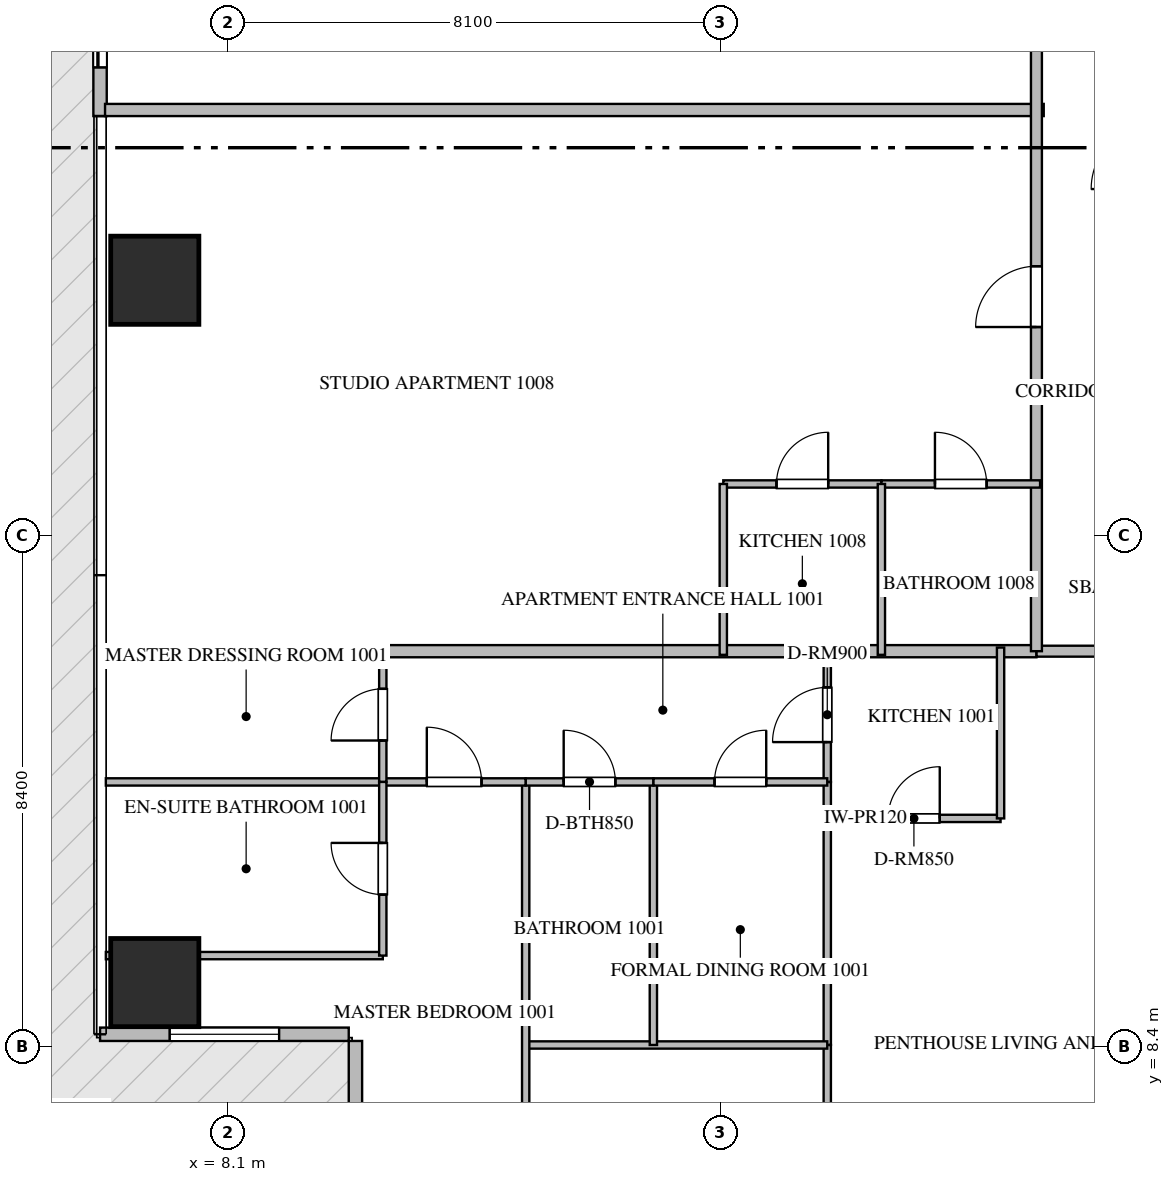
"""IFC4 building model, lengths in metres.
Left out: names, types, materials, properties, quantities, classifications, styles, units other than length and angle.
Written with IfcOpenShell. Run it as: python <this file> out.ifc"""

import sys

from ifc_helpers import new_model, si_unit, direction, frame, frame_2d, origin, origin_2d, place, context, subcontext, project, spatial, rectangle, extrude, source, transform, mapped, element, fill, save


model = new_model("IFC4")
c1 = context("Model", 3, precision=1e-05, world=origin(), true_north=direction((0.0, 1.0)))
c2 = subcontext(c1, "Body", "Model", "MODEL_VIEW")
j1 = project(units=[si_unit("LENGTHUNIT", "METRE"), si_unit("PLANEANGLEUNIT", "RADIAN")], contexts=[c1])
p1 = place(None, origin())
s1 = spatial("IfcSite", under=j1, at=p1, CompositionType="ELEMENT")
p2 = place(p1, origin())
s2 = spatial("IfcBuilding", under=s1, at=p2, CompositionType="ELEMENT")
p3 = place(p2, frame((0.0, 0.0, 45.45)))
s3 = spatial("IfcBuildingStorey", under=s2, at=p3, CompositionType="ELEMENT", Elevation=45.45)
m1 = source(origin(), c2, "Body", "SweptSolid", [
    extrude(rectangle(XDim=1.45, YDim=1.45, at=origin_2d()), origin(), (0.0, 0.0, 1.0), 3.75),
])
for number, where, z_axis, x_axis in (
    (1, (6.9, 9.45, -0.26), (0.0, 0.0, 1.0), (1.0, 0.0, 0.0)),
    (2, (6.9, 21.0, -0.26), (0.0, 0.0, 1.0), (1.0, 0.0, 0.0)),
):
    element("IfcColumn", number, at=place(p3, frame(where, z_axis=z_axis, x_axis=x_axis)), inside=s3, PredefinedType="COLUMN", context=c2, shape_type="MappedRepresentation", body=[
        mapped(m1, transform((0.0, 0.0, 0.0), scale=1.0)),
    ])
p4 = place(p3, frame((6.0, 26.7, 0.0), z_axis=(0.0, 0.0, 1.0), x_axis=(0.0, -1.0, 0.0)))
e3 = element("IfcWall", 3, at=p4, inside=s3, PredefinedType="ELEMENTEDWALL", context=c2, shape_type="SweptSolid", body=[
    extrude(rectangle(XDim=3.0, YDim=0.22, at=frame_2d((1.5, 0.0))), origin(), (0.0, 0.0, 1.0), 3.475),
])
p5 = place(p4, frame((0.8, 0.0, 0.0)))
e4 = element("IfcOpeningElement", 4, at=p5, cuts=e3, PredefinedType="OPENING", context=c2, shape_type="SweptSolid", body=[
    extrude(rectangle(XDim=1.4, YDim=2.25, at=frame_2d((0.7, 1.125))), frame((0.0, 0.12, 0.0), z_axis=(0.0, -1.0, 0.0), x_axis=(1.0, 0.0, 0.0)), (0.0, 0.0, 1.0), 0.24),
])
p6 = place(p3, frame((6.0, 8.6, 0.0), z_axis=(0.0, 0.0, 1.0), x_axis=(1.0, 0.0, 0.0)))
e5 = element("IfcWall", 5, at=p6, inside=s3, PredefinedType="ELEMENTEDWALL", context=c2, shape_type="SweptSolid", body=[
    extrude(rectangle(XDim=4.09, YDim=0.22, at=frame_2d((2.045, 0.0))), origin(), (0.0, 0.0, 1.0), 3.475),
])
p7 = place(p6, frame((1.145, 0.0, 0.65)))
e6 = element("IfcOpeningElement", 6, at=p7, cuts=e5, PredefinedType="OPENING", context=c2, shape_type="SweptSolid", body=[
    extrude(rectangle(XDim=1.8, YDim=2.1, at=frame_2d((0.9, 1.05))), frame((0.0, 0.12, 0.0), z_axis=(0.0, -1.0, 0.0), x_axis=(1.0, 0.0, 0.0)), (0.0, 0.0, 1.0), 0.24),
])
p8 = place(p3, frame((10.2, 8.49, 0.0), z_axis=(0.0, 0.0, 1.0), x_axis=(0.0, -1.0, 0.0)))
e7 = element("IfcWall", 7, at=p8, inside=s3, PredefinedType="ELEMENTEDWALL", context=c2, shape_type="SweptSolid", body=[
    extrude(rectangle(XDim=3.98, YDim=0.22, at=frame_2d((1.99, 0.0))), origin(), (0.0, 0.0, 1.0), 3.475),
])
p9 = place(p8, frame((1.09, 0.0, 0.65)))
e8 = element("IfcOpeningElement", 8, at=p9, cuts=e7, PredefinedType="OPENING", context=c2, shape_type="SweptSolid", body=[
    extrude(rectangle(XDim=1.8, YDim=2.1, at=frame_2d((0.9, 1.05))), frame((0.0, 0.12, 0.0), z_axis=(0.0, -1.0, 0.0), x_axis=(1.0, 0.0, 0.0)), (0.0, 0.0, 1.0), 0.24),
])
p10 = place(p3, frame((6.082, 23.8, 0.0), z_axis=(0.0, 0.0, 1.0), x_axis=(1.0, 0.0, 0.0)))
e9 = element("IfcWall", 9, at=p10, inside=s3, PredefinedType="PARTITIONING", context=c2, shape_type="SweptSolid", body=[
    extrude(rectangle(XDim=15.438, YDim=0.2, at=frame_2d((7.719, 0.0))), origin(), (0.0, 0.0, 1.0), 3.49),
])
p11 = place(p3, frame((6.082, 14.9, 0.0), z_axis=(0.0, 0.0, 1.0), x_axis=(1.0, 0.0, 0.0)))
e10 = element("IfcWall", 10, at=p11, inside=s3, PredefinedType="PARTITIONING", context=c2, shape_type="SweptSolid", body=[
    extrude(rectangle(XDim=15.318, YDim=0.2, at=frame_2d((7.659, 0.0))), origin(), (0.0, 0.0, 1.0), 3.49),
])
p12 = place(p3, frame((21.402, 14.9, 0.0), z_axis=(0.0, 0.0, 1.0), x_axis=(1.0, 0.0, 0.0)))
e11 = element("IfcWall", 11, at=p12, inside=s3, PredefinedType="PARTITIONING", context=c2, shape_type="SweptSolid", body=[
    extrude(rectangle(XDim=21.996, YDim=0.18, at=frame_2d((10.998, 0.0))), origin(), (0.0, 0.0, 1.0), 3.49),
])
p13 = place(p12, frame((2.1, 0.0, 0.0)))
e12 = element("IfcOpeningElement", 12, at=p13, cuts=e11, PredefinedType="OPENING", context=c2, shape_type="SweptSolid", body=[
    extrude(rectangle(XDim=1.0, YDim=2.15, at=frame_2d((0.5, 1.075))), frame((0.0, 0.1, 0.0), z_axis=(0.0, -1.0, 0.0), x_axis=(1.0, 0.0, 0.0)), (0.0, 0.0, 1.0), 0.2),
])
p14 = place(p12, frame((14.319, 0.0, 0.0)))
e13 = element("IfcOpeningElement", 13, at=p14, cuts=e11, PredefinedType="OPENING", context=c2, shape_type="SweptSolid", body=[
    extrude(rectangle(XDim=1.0, YDim=2.15, at=frame_2d((0.5, 1.075))), frame((0.0, 0.1, 0.0), z_axis=(0.0, -1.0, 0.0), x_axis=(1.0, 0.0, 0.0)), (0.0, 0.0, 1.0), 0.2),
])
p15 = place(p12, frame((18.896, 0.0, 0.0)))
e14 = element("IfcOpeningElement", 14, at=p15, cuts=e11, PredefinedType="OPENING", context=c2, shape_type="SweptSolid", body=[
    extrude(rectangle(XDim=1.0, YDim=2.15, at=frame_2d((0.5, 1.075))), frame((0.0, 0.1, 0.0), z_axis=(0.0, -1.0, 0.0), x_axis=(1.0, 0.0, 0.0)), (0.0, 0.0, 1.0), 0.2),
])
p16 = place(p3, frame((21.4, 14.9, 0.0), z_axis=(0.0, 0.0, 1.0), x_axis=(0.0, 1.0, 0.0)))
e15 = element("IfcWall", 15, at=p16, inside=s3, PredefinedType="PARTITIONING", context=c2, shape_type="SweptSolid", body=[
    extrude(rectangle(XDim=20.6, YDim=0.18, at=frame_2d((10.3, 0.0))), origin(), (0.0, 0.0, 1.0), 3.49),
])
p17 = place(p16, frame((5.331, 0.0, 0.0)))
e16 = element("IfcOpeningElement", 16, at=p17, cuts=e15, PredefinedType="OPENING", context=c2, shape_type="SweptSolid", body=[
    extrude(rectangle(XDim=1.0, YDim=2.15, at=frame_2d((0.5, 1.075))), frame((0.0, 0.1, 0.0), z_axis=(0.0, -1.0, 0.0), x_axis=(1.0, 0.0, 0.0)), (0.0, 0.0, 1.0), 0.2),
])
p18 = place(p16, frame((10.408, 0.0, 0.0)))
e17 = element("IfcOpeningElement", 17, at=p18, cuts=e15, PredefinedType="OPENING", context=c2, shape_type="SweptSolid", body=[
    extrude(rectangle(XDim=1.0, YDim=2.15, at=frame_2d((0.5, 1.075))), frame((0.0, 0.1, 0.0), z_axis=(0.0, -1.0, 0.0), x_axis=(1.0, 0.0, 0.0)), (0.0, 0.0, 1.0), 0.2),
])
p19 = place(p3, frame((17.96, 12.15, 0.0), z_axis=(0.0, 0.0, 1.0), x_axis=(1.0, 0.0, 0.0)))
e18 = element("IfcWall", 18, at=p19, inside=s3, PredefinedType="PARTITIONING", context=c2, shape_type="SweptSolid", body=[
    extrude(rectangle(XDim=2.85, YDim=0.12, at=frame_2d((1.425, 0.0))), origin(), (0.0, 0.0, 1.0), 3.49),
])
p20 = place(p19, frame((1.0, 0.0, 0.0)))
e19 = element("IfcOpeningElement", 19, at=p20, cuts=e18, PredefinedType="OPENING", context=c2, shape_type="SweptSolid", body=[
    extrude(rectangle(XDim=0.85, YDim=2.1, at=frame_2d((0.425, 1.05))), frame((0.0, 0.07, 0.0), z_axis=(0.0, -1.0, 0.0), x_axis=(1.0, 0.0, 0.0)), (0.0, 0.0, 1.0), 0.14),
])
p21 = place(p3, frame((20.81, 12.15, 0.0), z_axis=(0.0, 0.0, 1.0), x_axis=(0.0, 1.0, 0.0)))
e20 = element("IfcWall", 20, at=p21, inside=s3, PredefinedType="PARTITIONING", context=c2, shape_type="SweptSolid", body=[
    extrude(rectangle(XDim=2.81, YDim=0.12, at=frame_2d((1.405, 0.0))), origin(), (0.0, 0.0, 1.0), 3.49),
])
p22 = place(p3, frame((17.96, 12.75, 0.0), z_axis=(0.0, 0.0, 1.0), x_axis=(0.0, 1.0, 0.0)))
e21 = element("IfcWall", 21, at=p22, inside=s3, PredefinedType="PARTITIONING", context=c2, shape_type="SweptSolid", body=[
    extrude(rectangle(XDim=2.21, YDim=0.12, at=frame_2d((1.105, 0.0))), origin(), (0.0, 0.0, 1.0), 3.49),
])
p23 = place(p22, frame((0.655, 0.0, 0.0)))
e22 = element("IfcOpeningElement", 22, at=p23, cuts=e21, PredefinedType="OPENING", context=c2, shape_type="SweptSolid", body=[
    extrude(rectangle(XDim=0.9, YDim=2.1, at=frame_2d((0.45, 1.05))), frame((0.0, 0.07, 0.0), z_axis=(0.0, -1.0, 0.0), x_axis=(1.0, 0.0, 0.0)), (0.0, 0.0, 1.0), 0.14),
])
p24 = place(p3, frame((17.96, 0.295, 0.0), z_axis=(0.0, 0.0, 1.0), x_axis=(0.0, 1.0, 0.0)))
e23 = element("IfcWall", 23, at=p24, inside=s3, PredefinedType="PARTITIONING", context=c2, shape_type="SweptSolid", body=[
    extrude(rectangle(XDim=8.129, YDim=0.12, at=frame_2d((4.064, 0.0))), origin(), (0.0, 0.0, 1.0), 3.49),
])
p25 = place(p24, frame((3.976, 0.0, 0.0)))
e24 = element("IfcOpeningElement", 24, at=p25, cuts=e23, PredefinedType="OPENING", context=c2, shape_type="SweptSolid", body=[
    extrude(rectangle(XDim=0.9, YDim=2.1, at=frame_2d((0.45, 1.05))), frame((0.0, 0.07, 0.0), z_axis=(0.0, -1.0, 0.0), x_axis=(1.0, 0.0, 0.0)), (0.0, 0.0, 1.0), 0.14),
])
p26 = place(p3, frame((17.96, 8.426, 0.0), z_axis=(0.0, 0.0, 1.0), x_axis=(0.0, 1.0, 0.0)))
e25 = element("IfcWall", 25, at=p26, inside=s3, PredefinedType="PARTITIONING", context=c2, shape_type="SweptSolid", body=[
    extrude(rectangle(XDim=4.322, YDim=0.12, at=frame_2d((2.161, 0.0))), origin(), (0.0, 0.0, 1.0), 3.49),
])
p27 = place(p3, frame((13.0, 8.424, 0.0), z_axis=(0.0, 0.0, 1.0), x_axis=(1.0, 0.0, 0.0)))
e26 = element("IfcWall", 26, at=p27, inside=s3, PredefinedType="PARTITIONING", context=c2, shape_type="SweptSolid", body=[
    extrude(rectangle(XDim=4.96, YDim=0.12, at=frame_2d((2.48, 0.0))), origin(), (0.0, 0.0, 1.0), 3.49),
])
p28 = place(p3, frame((13.0, 4.495, 0.0), z_axis=(0.0, 0.0, 1.0), x_axis=(0.0, 1.0, 0.0)))
e27 = element("IfcWall", 27, at=p28, inside=s3, PredefinedType="PARTITIONING", context=c2, shape_type="SweptSolid", body=[
    extrude(rectangle(XDim=8.255, YDim=0.12, at=frame_2d((4.127, 0.0))), origin(), (0.0, 0.0, 1.0), 3.49),
])
p29 = place(p3, frame((15.1, 8.424, 0.0), z_axis=(0.0, 0.0, 1.0), x_axis=(0.0, 1.0, 0.0)))
e28 = element("IfcWall", 28, at=p29, inside=s3, PredefinedType="PARTITIONING", context=c2, shape_type="SweptSolid", body=[
    extrude(rectangle(XDim=4.326, YDim=0.12, at=frame_2d((2.163, 0.0))), origin(), (0.0, 0.0, 1.0), 2.922),
])
p30 = place(p3, frame((13.0, 12.75, 0.0), z_axis=(0.0, 0.0, 1.0), x_axis=(1.0, 0.0, 0.0)))
e29 = element("IfcWall", 29, at=p30, inside=s3, PredefinedType="PARTITIONING", context=c2, shape_type="SweptSolid", body=[
    extrude(rectangle(XDim=2.1, YDim=0.12, at=frame_2d((1.05, 0.0))), origin(), (0.0, 0.0, 1.0), 3.49),
])
p31 = place(p30, frame((0.625, 0.0, 0.0)))
e30 = element("IfcOpeningElement", 30, at=p31, cuts=e29, PredefinedType="OPENING", context=c2, shape_type="SweptSolid", body=[
    extrude(rectangle(XDim=0.85, YDim=2.1, at=frame_2d((0.425, 1.05))), frame((0.0, 0.07, 0.0), z_axis=(0.0, -1.0, 0.0), x_axis=(1.0, 0.0, 0.0)), (0.0, 0.0, 1.0), 0.14),
])
p32 = place(p3, frame((15.102, 12.75, 0.0), z_axis=(0.0, 0.0, 1.0), x_axis=(1.0, 0.0, 0.0)))
e31 = element("IfcWall", 31, at=p32, inside=s3, PredefinedType="PARTITIONING", context=c2, shape_type="SweptSolid", body=[
    extrude(rectangle(XDim=2.858, YDim=0.12, at=frame_2d((1.429, 0.0))), origin(), (0.0, 0.0, 1.0), 3.49),
])
p33 = place(p32, frame((1.004, 0.0, 0.0)))
e32 = element("IfcOpeningElement", 32, at=p33, cuts=e31, PredefinedType="OPENING", context=c2, shape_type="SweptSolid", body=[
    extrude(rectangle(XDim=0.85, YDim=2.1, at=frame_2d((0.425, 1.05))), frame((0.0, 0.07, 0.0), z_axis=(0.0, -1.0, 0.0), x_axis=(1.0, 0.0, 0.0)), (0.0, 0.0, 1.0), 0.14),
])
p34 = place(p3, frame((10.65, 12.75, 0.0), z_axis=(0.0, 0.0, 1.0), x_axis=(1.0, 0.0, 0.0)))
e33 = element("IfcWall", 33, at=p34, inside=s3, PredefinedType="PARTITIONING", context=c2, shape_type="SweptSolid", body=[
    extrude(rectangle(XDim=2.348, YDim=0.12, at=frame_2d((1.174, 0.0))), origin(), (0.0, 0.0, 1.0), 3.49),
])
p35 = place(p34, frame((0.724, 0.0, 0.0)))
e34 = element("IfcOpeningElement", 34, at=p35, cuts=e33, PredefinedType="OPENING", context=c2, shape_type="SweptSolid", body=[
    extrude(rectangle(XDim=0.9, YDim=2.1, at=frame_2d((0.45, 1.05))), frame((0.0, 0.07, 0.0), z_axis=(0.0, -1.0, 0.0), x_axis=(1.0, 0.0, 0.0)), (0.0, 0.0, 1.0), 0.14),
])
p36 = place(p3, frame((6.095, 9.894, 0.0), z_axis=(0.0, 0.0, 1.0), x_axis=(1.0, 0.0, 0.0)))
e35 = element("IfcWall", 35, at=p36, inside=s3, PredefinedType="PARTITIONING", context=c2, shape_type="SweptSolid", body=[
    extrude(rectangle(XDim=4.555, YDim=0.12, at=frame_2d((2.277, 0.0))), origin(), (0.0, 0.0, 1.0), 3.49),
])
p37 = place(p3, frame((6.095, 12.75, 0.0), z_axis=(0.0, 0.0, 1.0), x_axis=(1.0, 0.0, 0.0)))
e36 = element("IfcWall", 36, at=p37, inside=s3, PredefinedType="PARTITIONING", context=c2, shape_type="SweptSolid", body=[
    extrude(rectangle(XDim=4.553, YDim=0.12, at=frame_2d((2.276, 0.0))), origin(), (0.0, 0.0, 1.0), 3.49),
])
p38 = place(p3, frame((10.65, 9.894, 0.0), z_axis=(0.0, 0.0, 1.0), x_axis=(0.0, 1.0, 0.0)))
e37 = element("IfcWall", 37, at=p38, inside=s3, PredefinedType="PARTITIONING", context=c2, shape_type="SweptSolid", body=[
    extrude(rectangle(XDim=2.856, YDim=0.12, at=frame_2d((1.428, 0.0))), origin(), (0.0, 0.0, 1.0), 3.49),
])
p39 = place(p38, frame((1.003, 0.0, 0.0)))
e38 = element("IfcOpeningElement", 38, at=p39, cuts=e37, PredefinedType="OPENING", context=c2, shape_type="SweptSolid", body=[
    extrude(rectangle(XDim=0.85, YDim=2.1, at=frame_2d((0.425, 1.05))), frame((0.0, 0.07, 0.0), z_axis=(0.0, -1.0, 0.0), x_axis=(1.0, 0.0, 0.0)), (0.0, 0.0, 1.0), 0.14),
])
p40 = place(p3, frame((10.65, 12.752, 0.0), z_axis=(0.0, 0.0, 1.0), x_axis=(0.0, 1.0, 0.0)))
e39 = element("IfcWall", 39, at=p40, inside=s3, PredefinedType="PARTITIONING", context=c2, shape_type="SweptSolid", body=[
    extrude(rectangle(XDim=2.208, YDim=0.12, at=frame_2d((1.104, 0.0))), origin(), (0.0, 0.0, 1.0), 3.49),
])
p41 = place(p40, frame((0.679, 0.0, 0.0)))
e40 = element("IfcOpeningElement", 40, at=p41, cuts=e39, PredefinedType="OPENING", context=c2, shape_type="SweptSolid", body=[
    extrude(rectangle(XDim=0.85, YDim=2.1, at=frame_2d((0.425, 1.05))), frame((0.0, 0.07, 0.0), z_axis=(0.0, -1.0, 0.0), x_axis=(1.0, 0.0, 0.0)), (0.0, 0.0, 1.0), 0.14),
])
p42 = place(p3, frame((16.25, 17.65, 0.0), z_axis=(0.0, 0.0, 1.0), x_axis=(1.0, 0.0, 0.0)))
e41 = element("IfcWall", 41, at=p42, inside=s3, PredefinedType="PARTITIONING", context=c2, shape_type="SweptSolid", body=[
    extrude(rectangle(XDim=2.6, YDim=0.12, at=frame_2d((1.3, 0.0))), origin(), (0.0, 0.0, 1.0), 3.49),
])
p43 = place(p42, frame((0.875, 0.0, 0.0)))
e42 = element("IfcOpeningElement", 42, at=p43, cuts=e41, PredefinedType="OPENING", context=c2, shape_type="SweptSolid", body=[
    extrude(rectangle(XDim=0.85, YDim=2.1, at=frame_2d((0.425, 1.05))), frame((0.0, 0.07, 0.0), z_axis=(0.0, -1.0, 0.0), x_axis=(1.0, 0.0, 0.0)), (0.0, 0.0, 1.0), 0.14),
])
p44 = place(p3, frame((18.852, 17.65, 0.0), z_axis=(0.0, 0.0, 1.0), x_axis=(1.0, 0.0, 0.0)))
e43 = element("IfcWall", 43, at=p44, inside=s3, PredefinedType="PARTITIONING", context=c2, shape_type="SweptSolid", body=[
    extrude(rectangle(XDim=2.608, YDim=0.12, at=frame_2d((1.304, 0.0))), origin(), (0.0, 0.0, 1.0), 3.49),
])
p45 = place(p44, frame((0.879, 0.0, 0.0)))
e44 = element("IfcOpeningElement", 44, at=p45, cuts=e43, PredefinedType="OPENING", context=c2, shape_type="SweptSolid", body=[
    extrude(rectangle(XDim=0.85, YDim=2.1, at=frame_2d((0.425, 1.05))), frame((0.0, 0.07, 0.0), z_axis=(0.0, -1.0, 0.0), x_axis=(1.0, 0.0, 0.0)), (0.0, 0.0, 1.0), 0.14),
])
for number, where, z_axis, x_axis in (
    (45, (18.85, 14.84, 0.0), (0.0, 0.0, 1.0), (0.0, 1.0, 0.0)),
    (46, (16.25, 14.84, 0.0), (0.0, 0.0, 1.0), (0.0, 1.0, 0.0)),
):
    element("IfcWall", number, at=place(p3, frame(where, z_axis=z_axis, x_axis=x_axis)), inside=s3, PredefinedType="PARTITIONING", context=c2, shape_type="SweptSolid", body=[
        extrude(rectangle(XDim=2.81, YDim=0.12, at=frame_2d((1.405, 0.0))), origin(), (0.0, 0.0, 1.0), 3.49),
    ])
m2 = source(origin(), c2, "Body", "SweptSolid", [
    extrude(rectangle(XDim=1.4, YDim=2.25, at=frame_2d((0.7, 1.125))), frame((0.0, 0.025, 0.0), z_axis=(0.0, -1.0, 0.0), x_axis=(1.0, 0.0, 0.0)), (0.0, 0.0, 1.0), 0.05),
])
p46 = place(p5, origin())
e47 = element("IfcDoor", 47, at=p46, inside=s3, OperationType="SLIDING_TO_LEFT", PredefinedType="DOOR", context=c2, shape_type="MappedRepresentation", body=[
    mapped(m2, transform((0.0, 0.0, 0.0), scale=1.0)),
])
fill(e4, e47)
m3 = source(origin(), c2, "Body", "SweptSolid", [
    extrude(rectangle(XDim=1.8, YDim=2.1, at=frame_2d((0.9, 1.05))), frame((0.0, 0.03, 0.0), z_axis=(0.0, -1.0, 0.0), x_axis=(1.0, 0.0, 0.0)), (0.0, 0.0, 1.0), 0.06),
])
p47 = place(p7, origin())
e48 = element("IfcWindow", 48, at=p47, inside=s3, PartitioningType="SINGLE_PANEL", PredefinedType="WINDOW", context=c2, shape_type="MappedRepresentation", body=[
    mapped(m3, transform((0.0, 0.0, 0.0), scale=1.0)),
])
fill(e6, e48)
m4 = source(origin(), c2, "Body", "SweptSolid", [
    extrude(rectangle(XDim=1.0, YDim=2.15, at=frame_2d((0.5, 1.075))), frame((0.0, 0.025, 0.0), z_axis=(0.0, -1.0, 0.0), x_axis=(1.0, 0.0, 0.0)), (0.0, 0.0, 1.0), 0.05),
])
p48 = place(p17, origin())
e49 = element("IfcDoor", 49, at=p48, inside=s3, OperationType="SINGLE_SWING_LEFT", PredefinedType="DOOR", context=c2, shape_type="MappedRepresentation", body=[
    mapped(m4, transform((0.0, 0.0, 0.0), scale=1.0)),
])
fill(e16, e49)
m5 = source(origin(), c2, "Body", "SweptSolid", [
    extrude(rectangle(XDim=0.85, YDim=2.1, at=frame_2d((0.425, 1.05))), frame((0.0, 0.025, 0.0), z_axis=(0.0, -1.0, 0.0), x_axis=(1.0, 0.0, 0.0)), (0.0, 0.0, 1.0), 0.05),
])
p49 = place(p20, origin())
e50 = element("IfcDoor", 50, at=p49, inside=s3, OperationType="SINGLE_SWING_RIGHT", PredefinedType="DOOR", context=c2, shape_type="MappedRepresentation", body=[
    mapped(m5, transform((0.0, 0.0, 0.0), scale=1.0)),
])
fill(e19, e50)
m6 = source(origin(), c2, "Body", "SweptSolid", [
    extrude(rectangle(XDim=0.9, YDim=2.1, at=frame_2d((0.45, 1.05))), frame((0.0, 0.025, 0.0), z_axis=(0.0, -1.0, 0.0), x_axis=(1.0, 0.0, 0.0)), (0.0, 0.0, 1.0), 0.05),
])
p50 = place(p23, origin())
e51 = element("IfcDoor", 51, at=p50, inside=s3, OperationType="SINGLE_SWING_LEFT", PredefinedType="DOOR", context=c2, shape_type="MappedRepresentation", body=[
    mapped(m6, transform((0.0, 0.0, 0.0), scale=1.0)),
])
fill(e22, e51)
p51 = place(p31, origin())
e52 = element("IfcDoor", 52, at=p51, inside=s3, OperationType="SINGLE_SWING_LEFT", PredefinedType="DOOR", context=c2, shape_type="MappedRepresentation", body=[
    mapped(m5, transform((0.0, 0.0, 0.0), scale=1.0)),
])
fill(e30, e52)
p52 = place(p33, origin())
e53 = element("IfcDoor", 53, at=p52, inside=s3, OperationType="SINGLE_SWING_RIGHT", PredefinedType="DOOR", context=c2, shape_type="MappedRepresentation", body=[
    mapped(m5, transform((0.0, 0.0, 0.0), scale=1.0)),
])
fill(e32, e53)
p53 = place(p35, origin())
e54 = element("IfcDoor", 54, at=p53, inside=s3, OperationType="SINGLE_SWING_LEFT", PredefinedType="DOOR", context=c2, shape_type="MappedRepresentation", body=[
    mapped(m6, transform((0.0, 0.0, 0.0), scale=1.0)),
])
fill(e34, e54)
p54 = place(p39, origin())
e55 = element("IfcDoor", 55, at=p54, inside=s3, OperationType="SINGLE_SWING_RIGHT", PredefinedType="DOOR", context=c2, shape_type="MappedRepresentation", body=[
    mapped(m5, transform((0.0, 0.0, 0.0), scale=1.0)),
])
fill(e38, e55)
p55 = place(p41, origin())
e56 = element("IfcDoor", 56, at=p55, inside=s3, OperationType="SINGLE_SWING_LEFT", PredefinedType="DOOR", context=c2, shape_type="MappedRepresentation", body=[
    mapped(m5, transform((0.0, 0.0, 0.0), scale=1.0)),
])
fill(e40, e56)
p56 = place(p43, origin())
e57 = element("IfcDoor", 57, at=p56, inside=s3, OperationType="SINGLE_SWING_RIGHT", PredefinedType="DOOR", context=c2, shape_type="MappedRepresentation", body=[
    mapped(m5, transform((0.0, 0.0, 0.0), scale=1.0)),
])
fill(e42, e57)
p57 = place(p45, origin())
e58 = element("IfcDoor", 58, at=p57, inside=s3, OperationType="SINGLE_SWING_LEFT", PredefinedType="DOOR", context=c2, shape_type="MappedRepresentation", body=[
    mapped(m5, transform((0.0, 0.0, 0.0), scale=1.0)),
])
fill(e44, e58)
save(model, sys.argv[1])
